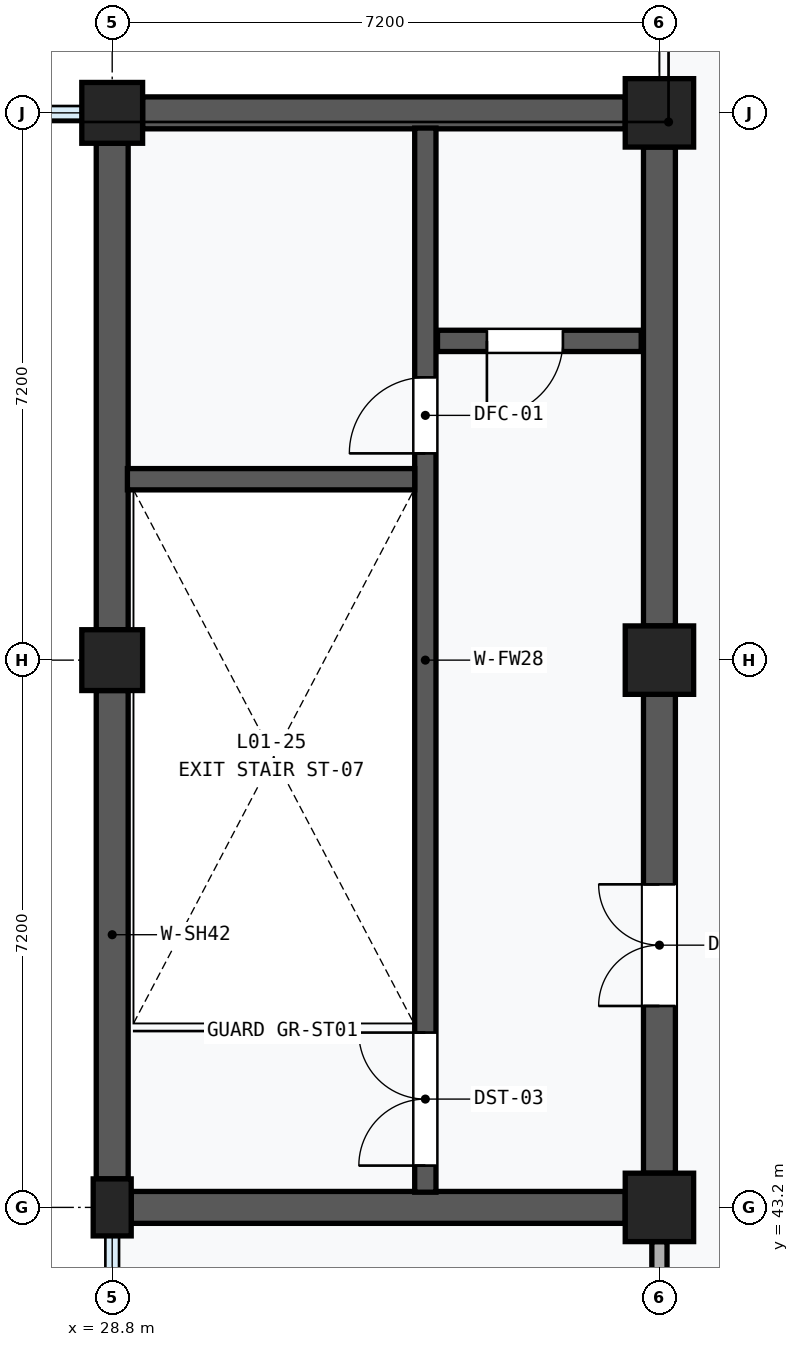
"""IFC4 building model, lengths in metres.
Left out: names, types, materials, properties, quantities, classifications, styles, units other than length and angle.
Written with IfcOpenShell. Run it as: python <this file> out.ifc"""

import sys

from ifc_helpers import new_model, si_unit, direction, frame, frame_2d, origin, origin_2d, place, context, subcontext, project, spatial, rectangle, extrude, element, fill, save


model = new_model("IFC4")
c1 = context("Model", 3, precision=1e-05, world=origin(), true_north=direction((0.0, 1.0)))
c2 = subcontext(c1, "Body", "Model", "MODEL_VIEW")
j1 = project(units=[si_unit("LENGTHUNIT", "METRE"), si_unit("PLANEANGLEUNIT", "RADIAN")], contexts=[c1])
p1 = place(None, origin())
s1 = spatial("IfcSite", under=j1, at=p1, CompositionType="ELEMENT")
p2 = place(p1, origin())
s2 = spatial("IfcBuilding", under=s1, at=p2, CompositionType="ELEMENT")
p3 = place(p2, frame((0.0, 0.0, 4.8)))
s3 = spatial("IfcBuildingStorey", under=s2, at=p3, CompositionType="ELEMENT", Elevation=4.8)
p4 = place(p3, frame((28.8, 43.2, 0.0), z_axis=(0.0, 0.0, 1.0), x_axis=(1.0, 0.0, 0.0)))
e1 = element("IfcColumn", 1, at=p4, inside=s3, PredefinedType="PILASTER", context=c2, shape_type="SweptSolid", body=[
    extrude(rectangle(XDim=0.5, YDim=0.75, at=origin_2d()), origin(), (0.0, 0.0, 1.0), 4.8),
])
for number, where, z_axis, x_axis in (
    (2, (28.8, 50.4, 0.0), (0.0, 0.0, 1.0), (1.0, 0.0, 0.0)),
    (3, (28.8, 57.6, 0.0), (0.0, 0.0, 1.0), (1.0, 0.0, 0.0)),
):
    element("IfcColumn", number, at=place(p3, frame(where, z_axis=z_axis, x_axis=x_axis)), inside=s3, PredefinedType="COLUMN", context=c2, shape_type="SweptSolid", body=[
        extrude(rectangle(XDim=0.8, YDim=0.8, at=origin_2d()), origin(), (0.0, 0.0, 1.0), 4.8),
    ])
for number, where, z_axis, x_axis in (
    (4, (36.0, 43.2, 0.0), (0.0, 0.0, 1.0), (1.0, 0.0, 0.0)),
    (5, (36.0, 50.4, 0.0), (0.0, 0.0, 1.0), (1.0, 0.0, 0.0)),
    (6, (36.0, 57.6, 0.0), (0.0, 0.0, 1.0), (1.0, 0.0, 0.0)),
):
    element("IfcColumn", number, at=place(p3, frame(where, z_axis=z_axis, x_axis=x_axis)), inside=s3, PredefinedType="COLUMN", context=c2, shape_type="SweptSolid", body=[
        extrude(rectangle(XDim=0.9, YDim=0.9, at=origin_2d()), origin(), (0.0, 0.0, 1.0), 4.8),
    ])
p5 = place(p3, frame((28.8, 43.575, 0.0), z_axis=(0.0, 0.0, 1.0), x_axis=(0.0, 1.0, 0.0)))
e7 = element("IfcWall", 7, at=p5, inside=s3, PredefinedType="SHEAR", context=c2, shape_type="SweptSolid", body=[
    extrude(rectangle(XDim=6.425, YDim=0.42, at=frame_2d((3.212, 0.0))), origin(), (0.0, 0.0, 1.0), 3.85),
])
p6 = place(p3, frame((28.8, 50.8, 0.0), z_axis=(0.0, 0.0, 1.0), x_axis=(0.0, 1.0, 0.0)))
e8 = element("IfcWall", 8, at=p6, inside=s3, PredefinedType="SHEAR", context=c2, shape_type="SweptSolid", body=[
    extrude(rectangle(XDim=6.4, YDim=0.42, at=frame_2d((3.2, 0.0))), origin(), (0.0, 0.0, 1.0), 3.85),
])
p7 = place(p3, frame((36.0, 43.65, 0.0), z_axis=(0.0, 0.0, 1.0), x_axis=(0.0, 1.0, 0.0)))
e9 = element("IfcWall", 9, at=p7, inside=s3, PredefinedType="SHEAR", context=c2, shape_type="SweptSolid", body=[
    extrude(rectangle(XDim=6.3, YDim=0.42, at=frame_2d((3.15, 0.0))), origin(), (0.0, 0.0, 1.0), 3.58),
])
p8 = place(p7, frame((2.2, 0.0, 0.0)))
e10 = element("IfcOpeningElement", 10, at=p8, cuts=e9, PredefinedType="OPENING", context=c2, shape_type="SweptSolid", body=[
    extrude(rectangle(XDim=1.6, YDim=2.2, at=frame_2d((0.8, 1.1))), frame((0.0, 0.222, 0.0), z_axis=(0.0, -1.0, 0.0), x_axis=(1.0, 0.0, 0.0)), (0.0, 0.0, 1.0), 0.444),
])
p9 = place(p3, frame((36.0, 50.85, 0.0), z_axis=(0.0, 0.0, 1.0), x_axis=(0.0, 1.0, 0.0)))
e11 = element("IfcWall", 11, at=p9, inside=s3, PredefinedType="SHEAR", context=c2, shape_type="SweptSolid", body=[
    extrude(rectangle(XDim=6.3, YDim=0.42, at=frame_2d((3.15, 0.0))), origin(), (0.0, 0.0, 1.0), 3.58),
])
p10 = place(p3, frame((29.05, 43.2, 0.0), z_axis=(0.0, 0.0, 1.0), x_axis=(1.0, 0.0, 0.0)))
e12 = element("IfcWall", 12, at=p10, inside=s3, PredefinedType="SHEAR", context=c2, shape_type="SweptSolid", body=[
    extrude(rectangle(XDim=6.5, YDim=0.42, at=frame_2d((3.25, 0.0))), origin(), (0.0, 0.0, 1.0), 3.58),
])
p11 = place(p3, frame((29.2, 57.6, 0.0), z_axis=(0.0, 0.0, 1.0), x_axis=(1.0, 0.0, 0.0)))
e13 = element("IfcWall", 13, at=p11, inside=s3, PredefinedType="SHEAR", context=c2, shape_type="SweptSolid", body=[
    extrude(rectangle(XDim=6.35, YDim=0.42, at=frame_2d((3.175, 0.0))), origin(), (0.0, 0.0, 1.0), 3.58),
])
p12 = place(p3, frame((32.92, 43.4, 0.0), z_axis=(0.0, 0.0, 1.0), x_axis=(0.0, 1.0, 0.0)))
e14 = element("IfcWall", 14, at=p12, inside=s3, PredefinedType="SHEAR", context=c2, shape_type="SweptSolid", body=[
    extrude(rectangle(XDim=14.0, YDim=0.28, at=frame_2d((7.0, 0.0))), origin(), (0.0, 0.0, 1.0), 4.48),
])
p13 = place(p12, frame((0.35, 0.0, 0.0)))
e15 = element("IfcOpeningElement", 15, at=p13, cuts=e14, PredefinedType="OPENING", context=c2, shape_type="SweptSolid", body=[
    extrude(rectangle(XDim=1.75, YDim=2.15, at=frame_2d((0.875, 1.075))), frame((0.0, 0.152, 0.0), z_axis=(0.0, -1.0, 0.0), x_axis=(1.0, 0.0, 0.0)), (0.0, 0.0, 1.0), 0.304),
])
p14 = place(p12, frame((9.72, 0.0, 0.0)))
e16 = element("IfcOpeningElement", 16, at=p14, cuts=e14, PredefinedType="OPENING", context=c2, shape_type="SweptSolid", body=[
    extrude(rectangle(XDim=1.0, YDim=2.15, at=frame_2d((0.5, 1.075))), frame((0.0, 0.152, 0.0), z_axis=(0.0, -1.0, 0.0), x_axis=(1.0, 0.0, 0.0)), (0.0, 0.0, 1.0), 0.304),
])
p15 = place(p3, frame((29.0, 52.78, 0.0), z_axis=(0.0, 0.0, 1.0), x_axis=(1.0, 0.0, 0.0)))
e17 = element("IfcWall", 17, at=p15, inside=s3, PredefinedType="SHEAR", context=c2, shape_type="SweptSolid", body=[
    extrude(rectangle(XDim=3.78, YDim=0.28, at=frame_2d((1.89, 0.0))), origin(), (0.0, 0.0, 1.0), 4.48),
])
p16 = place(p3, frame((33.08, 54.6, 0.0), z_axis=(0.0, 0.0, 1.0), x_axis=(1.0, 0.0, 0.0)))
e18 = element("IfcWall", 18, at=p16, inside=s3, PredefinedType="SHEAR", context=c2, shape_type="SweptSolid", body=[
    extrude(rectangle(XDim=2.68, YDim=0.28, at=frame_2d((1.34, 0.0))), origin(), (0.0, 0.0, 1.0), 4.48),
])
p17 = place(p16, frame((0.65, 0.0, 0.0)))
e19 = element("IfcOpeningElement", 19, at=p17, cuts=e18, PredefinedType="OPENING", context=c2, shape_type="SweptSolid", body=[
    extrude(rectangle(XDim=1.0, YDim=2.15, at=frame_2d((0.5, 1.075))), frame((0.0, 0.152, 0.0), z_axis=(0.0, -1.0, 0.0), x_axis=(1.0, 0.0, 0.0)), (0.0, 0.0, 1.0), 0.304),
])
p18 = place(p3, frame((36.0, 36.45, 0.0), z_axis=(0.0, 0.0, 1.0), x_axis=(0.0, 1.0, 0.0)))
e20 = element("IfcWall", 20, at=p18, inside=s3, PredefinedType="PARTITIONING", context=c2, shape_type="SweptSolid", body=[
    extrude(rectangle(XDim=6.3, YDim=0.2, at=frame_2d((3.15, 0.0))), origin(), (0.0, 0.0, 1.0), 3.58),
])
p19 = place(p8, origin())
e21 = element("IfcDoor", 21, at=p19, inside=s3, OperationType="DOUBLE_DOOR_SINGLE_SWING", PredefinedType="DOOR", context=c2, shape_type="SweptSolid", body=[
    extrude(rectangle(XDim=1.6, YDim=2.2, at=frame_2d((0.8, 1.1))), frame((0.0, 0.025, 0.0), z_axis=(0.0, -1.0, 0.0), x_axis=(1.0, 0.0, 0.0)), (0.0, 0.0, 1.0), 0.05),
])
fill(e10, e21)
p20 = place(p13, origin())
e22 = element("IfcDoor", 22, at=p20, inside=s3, OperationType="DOUBLE_DOOR_SINGLE_SWING", PredefinedType="DOOR", context=c2, shape_type="SweptSolid", body=[
    extrude(rectangle(XDim=1.75, YDim=2.15, at=frame_2d((0.875, 1.075))), frame((0.0, 0.025, 0.0), z_axis=(0.0, -1.0, 0.0), x_axis=(1.0, 0.0, 0.0)), (0.0, 0.0, 1.0), 0.05),
])
fill(e15, e22)
p21 = place(p14, origin())
e23 = element("IfcDoor", 23, at=p21, inside=s3, OperationType="SINGLE_SWING_LEFT", PredefinedType="DOOR", context=c2, shape_type="SweptSolid", body=[
    extrude(rectangle(XDim=1.0, YDim=2.15, at=frame_2d((0.5, 1.075))), frame((0.0, 0.025, 0.0), z_axis=(0.0, -1.0, 0.0), x_axis=(1.0, 0.0, 0.0)), (0.0, 0.0, 1.0), 0.05),
])
fill(e16, e23)
p22 = place(p17, frame((1.0, 0.0, 0.0), z_axis=(0.0, 0.0, 1.0), x_axis=(-1.0, 0.0, 0.0)))
e24 = element("IfcDoor", 24, at=p22, inside=s3, OperationType="SINGLE_SWING_RIGHT", PredefinedType="DOOR", context=c2, shape_type="SweptSolid", body=[
    extrude(rectangle(XDim=1.0, YDim=2.15, at=frame_2d((0.5, 1.075))), frame((0.0, 0.025, 0.0), z_axis=(0.0, -1.0, 0.0), x_axis=(1.0, 0.0, 0.0)), (0.0, 0.0, 1.0), 0.05),
])
fill(e19, e24)
save(model, sys.argv[1])
